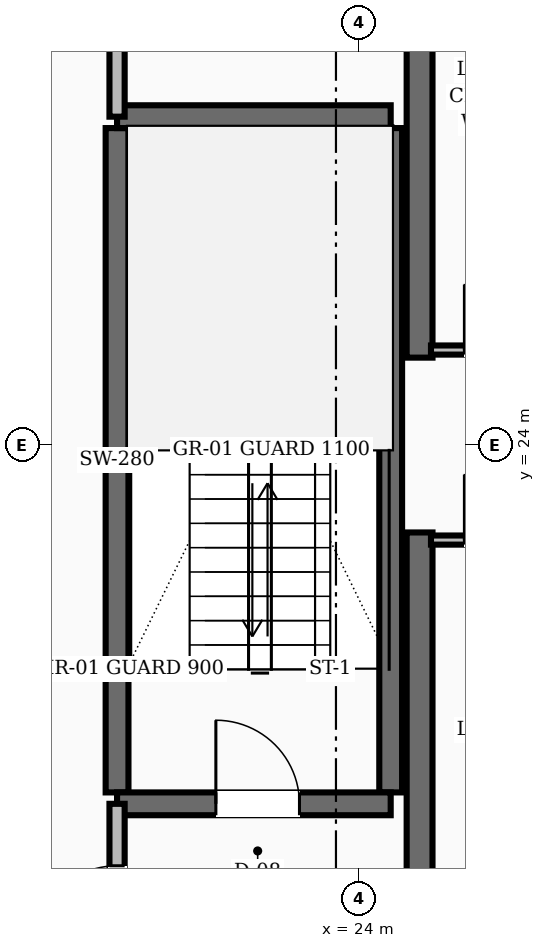
"""IFC4 building model, lengths in metres.
Left out: names, types, materials, properties, quantities, classifications, styles, units other than length and angle.
Written with IfcOpenShell. Run it as: python <this file> out.ifc"""

import sys

from ifc_helpers import new_model, si_unit, direction, frame, frame_2d, origin, place, context, subcontext, project, spatial, rectangle, extrude, element, fill, save


model = new_model("IFC4")
c1 = context("Model", 3, precision=1e-05, world=origin(), true_north=direction((0.0, 1.0)))
c2 = subcontext(c1, "Body", "Model", "MODEL_VIEW")
j1 = project(units=[si_unit("LENGTHUNIT", "METRE"), si_unit("PLANEANGLEUNIT", "RADIAN")], contexts=[c1])
p1 = place(None, origin())
s1 = spatial("IfcSite", under=j1, at=p1, CompositionType="ELEMENT")
p2 = place(p1, origin())
s2 = spatial("IfcBuilding", under=s1, at=p2, CompositionType="ELEMENT")
p3 = place(p2, frame((0.0, 0.0, 174.8)))
s3 = spatial("IfcBuildingStorey", under=s2, at=p3, CompositionType="ELEMENT", Elevation=174.8)
for number, where, z_axis, x_axis in (
    (1, (24.8, 16.55, 0.0), (0.0, 0.0, 1.0), (0.0, 1.0, 0.0)),
    (2, (24.8, 25.15, 0.0), (0.0, 0.0, 1.0), (0.0, 1.0, 0.0)),
):
    element("IfcWall", number, at=place(p3, frame(where, z_axis=z_axis, x_axis=x_axis)), inside=s3, PredefinedType="SHEAR", context=c2, shape_type="SweptSolid", body=[
        extrude(rectangle(XDim=6.3, YDim=0.34, at=frame_2d((3.15, 0.0))), origin(), (0.0, 0.0, 1.0), 3.6),
    ])
for number, where, z_axis, x_axis in (
    (3, (20.82, 19.43, 0.0), (0.0, 0.0, 1.0), (0.0, 1.0, 0.0)),
    (4, (24.42, 19.43, 0.0), (0.0, 0.0, 1.0), (0.0, 1.0, 0.0)),
):
    element("IfcWall", number, at=place(p3, frame(where, z_axis=z_axis, x_axis=x_axis)), inside=s3, PredefinedType="SHEAR", context=c2, shape_type="SweptSolid", body=[
        extrude(rectangle(XDim=8.74, YDim=0.3, at=frame_2d((4.37, 0.0))), origin(), (0.0, 0.0, 1.0), 3.6),
    ])
p4 = place(p3, frame((20.82, 19.28, 0.0), z_axis=(0.0, 0.0, 1.0), x_axis=(1.0, 0.0, 0.0)))
e5 = element("IfcWall", 5, at=p4, inside=s3, PredefinedType="SHEAR", context=c2, shape_type="SweptSolid", body=[
    extrude(rectangle(XDim=3.6, YDim=0.3, at=frame_2d((1.8, 0.0))), origin(), (0.0, 0.0, 1.0), 3.6),
])
p5 = place(p4, frame((1.3, 0.0, 0.0)))
e6 = element("IfcOpeningElement", 6, at=p5, cuts=e5, PredefinedType="OPENING", context=c2, shape_type="SweptSolid", body=[
    extrude(rectangle(XDim=1.1, YDim=2.1, at=frame_2d((0.55, 1.05))), frame((0.0, 0.16, 0.0), z_axis=(0.0, -1.0, 0.0), x_axis=(1.0, 0.0, 0.0)), (0.0, 0.0, 1.0), 0.32),
])
p6 = place(p3, frame((20.82, 28.32, 0.0), z_axis=(0.0, 0.0, 1.0), x_axis=(1.0, 0.0, 0.0)))
e7 = element("IfcWall", 7, at=p6, inside=s3, PredefinedType="SHEAR", context=c2, shape_type="SweptSolid", body=[
    extrude(rectangle(XDim=3.6, YDim=0.3, at=frame_2d((1.8, 0.0))), origin(), (0.0, 0.0, 1.0), 3.6),
])
p7 = place(p3, frame((20.82, 16.55, 0.0), z_axis=(0.0, 0.0, 1.0), x_axis=(0.0, 1.0, 0.0)))
e8 = element("IfcWall", 8, at=p7, inside=s3, PredefinedType="SOLIDWALL", context=c2, shape_type="SweptSolid", body=[
    extrude(rectangle(XDim=2.73, YDim=0.2, at=frame_2d((1.365, 0.0))), origin(), (0.0, 0.0, 1.0), 2.8),
])
p8 = place(p7, frame((0.815, 0.0, 0.0)))
e9 = element("IfcOpeningElement", 9, at=p8, cuts=e8, PredefinedType="OPENING", context=c2, shape_type="SweptSolid", body=[
    extrude(rectangle(XDim=1.1, YDim=2.1, at=frame_2d((0.55, 1.05))), frame((0.0, 0.11, 0.0), z_axis=(0.0, -1.0, 0.0), x_axis=(1.0, 0.0, 0.0)), (0.0, 0.0, 1.0), 0.22),
])
p9 = place(p3, frame((20.82, 28.32, 0.0), z_axis=(0.0, 0.0, 1.0), x_axis=(0.0, 1.0, 0.0)))
e10 = element("IfcWall", 10, at=p9, inside=s3, PredefinedType="SOLIDWALL", context=c2, shape_type="SweptSolid", body=[
    extrude(rectangle(XDim=3.13, YDim=0.2, at=frame_2d((1.565, 0.0))), origin(), (0.0, 0.0, 1.0), 2.8),
])
p10 = place(p9, frame((1.09, 0.0, 0.0)))
e11 = element("IfcOpeningElement", 11, at=p10, cuts=e10, PredefinedType="OPENING", context=c2, shape_type="SweptSolid", body=[
    extrude(rectangle(XDim=0.95, YDim=2.1, at=frame_2d((0.475, 1.05))), frame((0.0, 0.11, 0.0), z_axis=(0.0, -1.0, 0.0), x_axis=(1.0, 0.0, 0.0)), (0.0, 0.0, 1.0), 0.22),
])
p11 = place(p3, frame((24.95, 25.25, 0.0), z_axis=(0.0, 0.0, 1.0), x_axis=(1.0, 0.0, 0.0)))
e12 = element("IfcWall", 12, at=p11, inside=s3, PredefinedType="PARTITIONING", context=c2, shape_type="SweptSolid", body=[
    extrude(rectangle(XDim=3.2, YDim=0.12, at=frame_2d((1.6, 0.0))), origin(), (0.0, 0.0, 1.0), 2.8),
])
p12 = place(p11, frame((0.44, 0.0, 0.0)))
e13 = element("IfcOpeningElement", 13, at=p12, cuts=e12, PredefinedType="OPENING", context=c2, shape_type="SweptSolid", body=[
    extrude(rectangle(XDim=0.86, YDim=2.1, at=frame_2d((0.43, 1.05))), frame((0.0, 0.07, 0.0), z_axis=(0.0, -1.0, 0.0), x_axis=(1.0, 0.0, 0.0)), (0.0, 0.0, 1.0), 0.14),
])
p13 = place(p11, frame((1.9, 0.0, 0.0)))
e14 = element("IfcOpeningElement", 14, at=p13, cuts=e12, PredefinedType="OPENING", context=c2, shape_type="SweptSolid", body=[
    extrude(rectangle(XDim=0.86, YDim=2.1, at=frame_2d((0.43, 1.05))), frame((0.0, 0.07, 0.0), z_axis=(0.0, -1.0, 0.0), x_axis=(1.0, 0.0, 0.0)), (0.0, 0.0, 1.0), 0.14),
])
p14 = place(p3, frame((24.95, 22.75, 0.0), z_axis=(0.0, 0.0, 1.0), x_axis=(1.0, 0.0, 0.0)))
e15 = element("IfcWall", 15, at=p14, inside=s3, PredefinedType="PARTITIONING", context=c2, shape_type="SweptSolid", body=[
    extrude(rectangle(XDim=3.2, YDim=0.12, at=frame_2d((1.6, 0.0))), origin(), (0.0, 0.0, 1.0), 2.8),
])
p15 = place(p14, frame((0.44, 0.0, 0.0)))
e16 = element("IfcOpeningElement", 16, at=p15, cuts=e15, PredefinedType="OPENING", context=c2, shape_type="SweptSolid", body=[
    extrude(rectangle(XDim=0.86, YDim=2.1, at=frame_2d((0.43, 1.05))), frame((0.0, 0.07, 0.0), z_axis=(0.0, -1.0, 0.0), x_axis=(1.0, 0.0, 0.0)), (0.0, 0.0, 1.0), 0.14),
])
p16 = place(p14, frame((1.9, 0.0, 0.0)))
e17 = element("IfcOpeningElement", 17, at=p16, cuts=e15, PredefinedType="OPENING", context=c2, shape_type="SweptSolid", body=[
    extrude(rectangle(XDim=0.86, YDim=2.1, at=frame_2d((0.43, 1.05))), frame((0.0, 0.07, 0.0), z_axis=(0.0, -1.0, 0.0), x_axis=(1.0, 0.0, 0.0)), (0.0, 0.0, 1.0), 0.14),
])
p17 = place(p5, origin())
e18 = element("IfcDoor", 18, at=p17, inside=s3, OperationType="SINGLE_SWING_LEFT", PredefinedType="DOOR", context=c2, shape_type="SweptSolid", body=[
    extrude(rectangle(XDim=1.1, YDim=2.1, at=frame_2d((0.55, 1.05))), frame((0.0, 0.025, 0.0), z_axis=(0.0, -1.0, 0.0), x_axis=(1.0, 0.0, 0.0)), (0.0, 0.0, 1.0), 0.05),
])
fill(e6, e18)
p18 = place(p8, origin())
e19 = element("IfcDoor", 19, at=p18, inside=s3, OperationType="SINGLE_SWING_LEFT", PredefinedType="DOOR", context=c2, shape_type="SweptSolid", body=[
    extrude(rectangle(XDim=1.1, YDim=2.1, at=frame_2d((0.55, 1.05))), frame((0.0, 0.025, 0.0), z_axis=(0.0, -1.0, 0.0), x_axis=(1.0, 0.0, 0.0)), (0.0, 0.0, 1.0), 0.05),
])
fill(e9, e19)
p19 = place(p12, origin())
e20 = element("IfcDoor", 20, at=p19, inside=s3, OperationType="SINGLE_SWING_LEFT", PredefinedType="DOOR", context=c2, shape_type="SweptSolid", body=[
    extrude(rectangle(XDim=0.86, YDim=2.1, at=frame_2d((0.43, 1.05))), frame((0.0, 0.025, 0.0), z_axis=(0.0, -1.0, 0.0), x_axis=(1.0, 0.0, 0.0)), (0.0, 0.0, 1.0), 0.05),
])
fill(e13, e20)
p20 = place(p15, origin())
e21 = element("IfcDoor", 21, at=p20, inside=s3, OperationType="SINGLE_SWING_LEFT", PredefinedType="DOOR", context=c2, shape_type="SweptSolid", body=[
    extrude(rectangle(XDim=0.86, YDim=2.1, at=frame_2d((0.43, 1.05))), frame((0.0, 0.025, 0.0), z_axis=(0.0, -1.0, 0.0), x_axis=(1.0, 0.0, 0.0)), (0.0, 0.0, 1.0), 0.05),
])
fill(e16, e21)
save(model, sys.argv[1])
